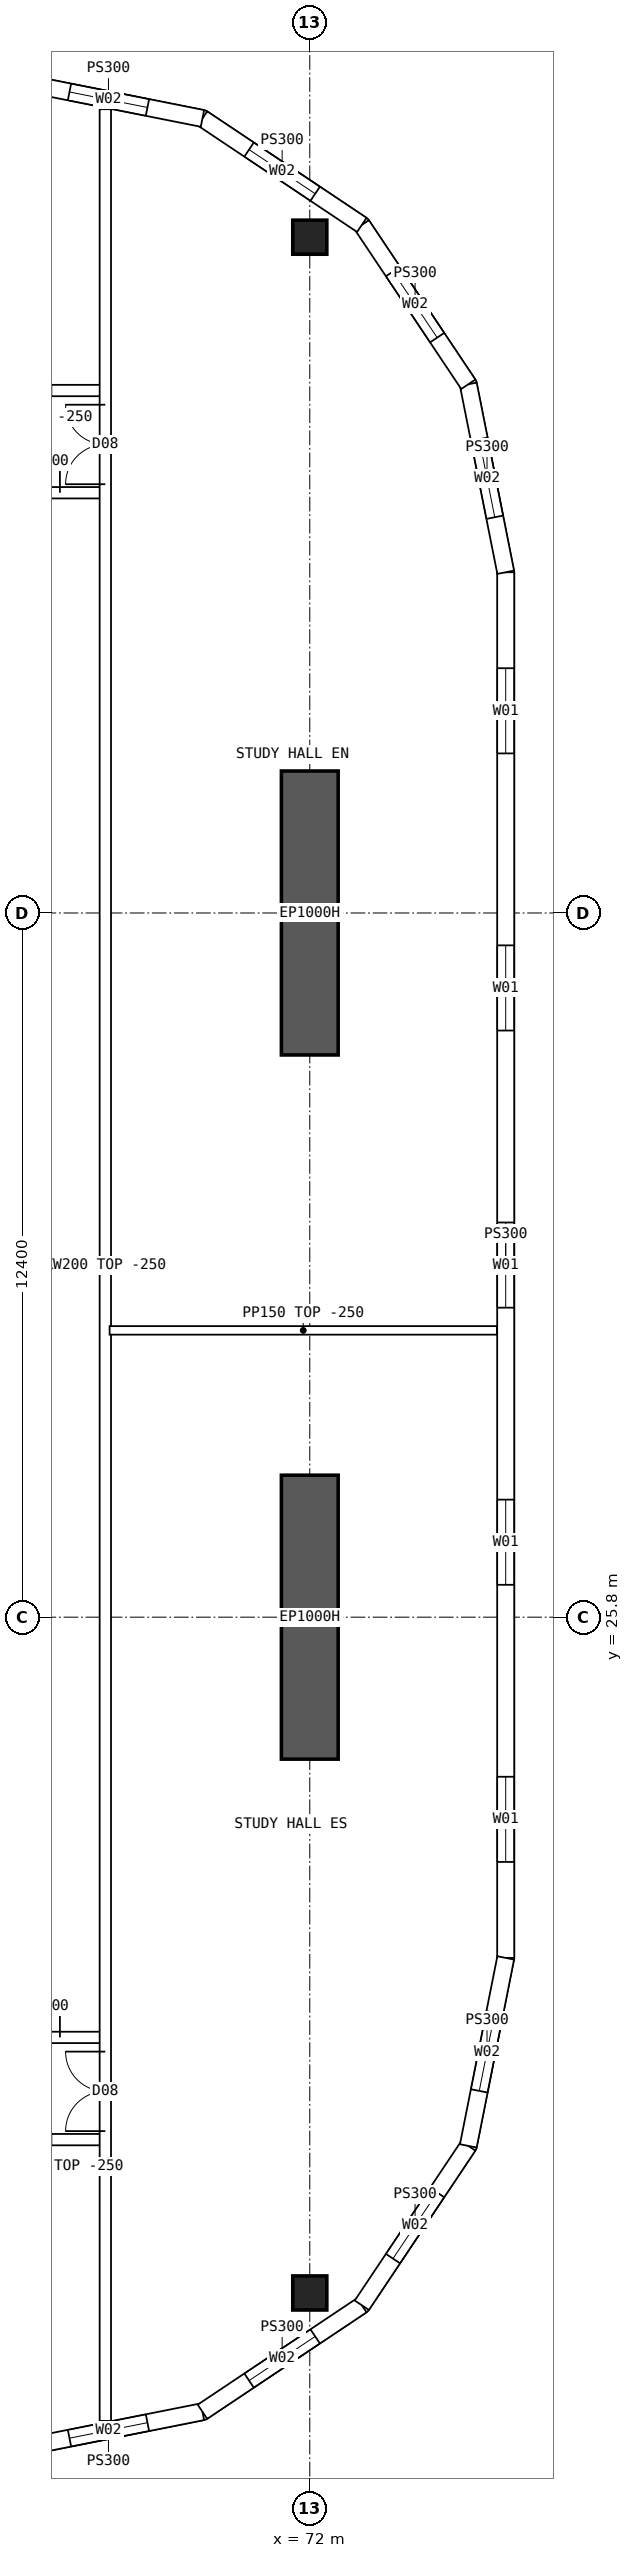
"""IFC4 building model, lengths in metres.
Left out: names, types, materials, properties, quantities, classifications, styles, units other than length and angle.
Written with IfcOpenShell. Run it as: python <this file> out.ifc"""

import sys

from ifc_helpers import new_model, si_unit, direction, frame, frame_2d, origin, origin_2d, place, context, subcontext, project, spatial, polyline, rectangle, hollow_rectangle, outline, extrude, element, fill, save


model = new_model("IFC4")
c1 = context("Model", 3, precision=1e-05, world=origin(), true_north=direction((0.0, 1.0)))
c2 = subcontext(c1, "Body", "Model", "MODEL_VIEW")
j1 = project(units=[si_unit("LENGTHUNIT", "METRE"), si_unit("PLANEANGLEUNIT", "RADIAN")], contexts=[c1])
p1 = place(None, origin())
s1 = spatial("IfcSite", under=j1, at=p1, CompositionType="ELEMENT")
p2 = place(p1, origin())
s2 = spatial("IfcBuilding", under=s1, at=p2, CompositionType="ELEMENT")
p3 = place(p2, frame((0.0, 0.0, 239.05)))
s3 = spatial("IfcBuildingStorey", under=s2, at=p3, CompositionType="ELEMENT", Elevation=239.05)
for number, where, z_axis, x_axis in (
    (1, (72.0, 13.9, 0.0), (0.0, 0.0, 1.0), (1.0, 0.0, 0.0)),
    (2, (72.0, 50.1, 0.0), (0.0, 0.0, 1.0), (1.0, 0.0, 0.0)),
):
    element("IfcColumn", number, at=place(p3, frame(where, z_axis=z_axis, x_axis=x_axis)), inside=s3, PredefinedType="COLUMN", context=c2, shape_type="SweptSolid", body=[
        extrude(hollow_rectangle(XDim=0.6, YDim=0.6, WallThickness=0.06, at=origin_2d()), origin(), (0.0, 0.0, 1.0), 3.75),
    ])
for number, where, z_axis, x_axis in (
    (3, (72.0, 23.3, 0.0), (0.0, 0.0, 1.0), (0.0, 1.0, 0.0)),
    (4, (72.0, 35.7, 0.0), (0.0, 0.0, 1.0), (0.0, 1.0, 0.0)),
):
    element("IfcWall", number, at=place(p3, frame(where, z_axis=z_axis, x_axis=x_axis)), inside=s3, PredefinedType="SHEAR", context=c2, shape_type="SweptSolid", body=[
        extrude(rectangle(XDim=5.0, YDim=1.0, at=frame_2d((2.5, 0.0))), origin(), (0.0, 0.0, 1.0), 3.75),
    ])
p4 = place(p3, frame((75.45, 19.8, 0.0), z_axis=(0.0, 0.0, 1.0), x_axis=(0.0, 1.0, 0.0)))
e5 = element("IfcWall", 5, at=p4, inside=s3, PredefinedType="SOLIDWALL", context=c2, shape_type="SweptSolid", body=[
    extrude(outline(polyline([(-0.015, -0.15), (24.415, -0.15), (24.385, 0.15), (0.015, 0.15), (-0.015, -0.15)])), origin(), (0.0, 0.0, 1.0), 3.5),
])
p5 = place(p4, frame((1.69, 0.0, 0.9)))
e6 = element("IfcOpeningElement", 6, at=p5, cuts=e5, PredefinedType="OPENING", context=c2, shape_type="SweptSolid", body=[
    extrude(rectangle(XDim=1.5, YDim=2.0, at=frame_2d((0.75, 1.0))), frame((0.0, 0.16, 0.0), z_axis=(0.0, -1.0, 0.0), x_axis=(1.0, 0.0, 0.0)), (0.0, 0.0, 1.0), 0.32),
])
p6 = place(p4, frame((6.57, 0.0, 0.9)))
e7 = element("IfcOpeningElement", 7, at=p6, cuts=e5, PredefinedType="OPENING", context=c2, shape_type="SweptSolid", body=[
    extrude(rectangle(XDim=1.5, YDim=2.0, at=frame_2d((0.75, 1.0))), frame((0.0, 0.16, 0.0), z_axis=(0.0, -1.0, 0.0), x_axis=(1.0, 0.0, 0.0)), (0.0, 0.0, 1.0), 0.32),
])
p7 = place(p4, frame((11.45, 0.0, 0.9)))
e8 = element("IfcOpeningElement", 8, at=p7, cuts=e5, PredefinedType="OPENING", context=c2, shape_type="SweptSolid", body=[
    extrude(rectangle(XDim=1.5, YDim=2.0, at=frame_2d((0.75, 1.0))), frame((0.0, 0.16, 0.0), z_axis=(0.0, -1.0, 0.0), x_axis=(1.0, 0.0, 0.0)), (0.0, 0.0, 1.0), 0.32),
])
p8 = place(p4, frame((16.33, 0.0, 0.9)))
e9 = element("IfcOpeningElement", 9, at=p8, cuts=e5, PredefinedType="OPENING", context=c2, shape_type="SweptSolid", body=[
    extrude(rectangle(XDim=1.5, YDim=2.0, at=frame_2d((0.75, 1.0))), frame((0.0, 0.16, 0.0), z_axis=(0.0, -1.0, 0.0), x_axis=(1.0, 0.0, 0.0)), (0.0, 0.0, 1.0), 0.32),
])
p9 = place(p4, frame((21.21, 0.0, 0.9)))
e10 = element("IfcOpeningElement", 10, at=p9, cuts=e5, PredefinedType="OPENING", context=c2, shape_type="SweptSolid", body=[
    extrude(rectangle(XDim=1.5, YDim=2.0, at=frame_2d((0.75, 1.0))), frame((0.0, 0.16, 0.0), z_axis=(0.0, -1.0, 0.0), x_axis=(1.0, 0.0, 0.0)), (0.0, 0.0, 1.0), 0.32),
])
p10 = place(p3, frame((66.8, 11.15, 0.0), z_axis=(0.0, 0.0, 1.0), x_axis=(0.98078325777, 0.195100490205, 0.0)))
e11 = element("IfcWall", 11, at=p10, inside=s3, PredefinedType="SOLIDWALL", context=c2, shape_type="SweptSolid", body=[
    extrude(outline(polyline([(-0.03, -0.15), (3.405, -0.15), (3.345, 0.15), (0.03, 0.15), (-0.03, -0.15)])), origin(), (0.0, 0.0, 1.0), 3.5),
])
p11 = place(p10, frame((0.988, 0.0, 0.9)))
e12 = element("IfcOpeningElement", 12, at=p11, cuts=e11, PredefinedType="OPENING", context=c2, shape_type="SweptSolid", body=[
    extrude(rectangle(XDim=1.4, YDim=1.8, at=frame_2d((0.7, 0.9))), frame((0.0, 0.16, 0.0), z_axis=(0.0, -1.0, 0.0), x_axis=(1.0, 0.0, 0.0)), (0.0, 0.0, 1.0), 0.32),
])
p12 = place(p3, frame((70.11, 11.808, 0.0), z_axis=(0.0, 0.0, 1.0), x_axis=(0.831460037396, 0.555584562613, 0.0)))
e13 = element("IfcWall", 13, at=p12, inside=s3, PredefinedType="SOLIDWALL", context=c2, shape_type="SweptSolid", body=[
    extrude(outline(polyline([(-0.03, -0.15), (3.405, -0.15), (3.345, 0.15), (0.03, 0.15), (-0.03, -0.15)])), origin(), (0.0, 0.0, 1.0), 3.5),
])
p13 = place(p12, frame((0.988, 0.0, 0.9)))
e14 = element("IfcOpeningElement", 14, at=p13, cuts=e13, PredefinedType="OPENING", context=c2, shape_type="SweptSolid", body=[
    extrude(rectangle(XDim=1.4, YDim=1.8, at=frame_2d((0.7, 0.9))), frame((0.0, 0.16, 0.0), z_axis=(0.0, -1.0, 0.0), x_axis=(1.0, 0.0, 0.0)), (0.0, 0.0, 1.0), 0.32),
])
p14 = place(p3, frame((72.917, 13.684, 0.0), z_axis=(0.0, 0.0, 1.0), x_axis=(0.555567969291, 0.831471124873, 0.0)))
e15 = element("IfcWall", 15, at=p14, inside=s3, PredefinedType="SOLIDWALL", context=c2, shape_type="SweptSolid", body=[
    extrude(outline(polyline([(-0.03, -0.15), (3.405, -0.15), (3.345, 0.15), (0.03, 0.15), (-0.03, -0.15)])), origin(), (0.0, 0.0, 1.0), 3.5),
])
p15 = place(p14, frame((0.988, 0.0, 0.9)))
e16 = element("IfcOpeningElement", 16, at=p15, cuts=e15, PredefinedType="OPENING", context=c2, shape_type="SweptSolid", body=[
    extrude(rectangle(XDim=1.4, YDim=1.8, at=frame_2d((0.7, 0.9))), frame((0.0, 0.16, 0.0), z_axis=(0.0, -1.0, 0.0), x_axis=(1.0, 0.0, 0.0)), (0.0, 0.0, 1.0), 0.32),
])
p16 = place(p3, frame((74.792, 16.49, 0.0), z_axis=(0.0, 0.0, 1.0), x_axis=(0.19508664885, 0.980786011034, 0.0)))
e17 = element("IfcWall", 17, at=p16, inside=s3, PredefinedType="SOLIDWALL", context=c2, shape_type="SweptSolid", body=[
    extrude(outline(polyline([(-0.03, -0.15), (3.39, -0.15), (3.36, 0.15), (0.03, 0.15), (-0.03, -0.15)])), origin(), (0.0, 0.0, 1.0), 3.5),
])
p17 = place(p16, frame((0.988, 0.0, 0.9)))
e18 = element("IfcOpeningElement", 18, at=p17, cuts=e17, PredefinedType="OPENING", context=c2, shape_type="SweptSolid", body=[
    extrude(rectangle(XDim=1.4, YDim=1.8, at=frame_2d((0.7, 0.9))), frame((0.0, 0.16, 0.0), z_axis=(0.0, -1.0, 0.0), x_axis=(1.0, 0.0, 0.0)), (0.0, 0.0, 1.0), 0.32),
])
p18 = place(p3, frame((75.45, 44.2, 0.0), z_axis=(0.0, 0.0, 1.0), x_axis=(-0.19508664885, 0.980786011034, 0.0)))
e19 = element("IfcWall", 19, at=p18, inside=s3, PredefinedType="SOLIDWALL", context=c2, shape_type="SweptSolid", body=[
    extrude(outline(polyline([(-0.015, -0.15), (3.405, -0.15), (3.345, 0.15), (0.015, 0.15), (-0.015, -0.15)])), origin(), (0.0, 0.0, 1.0), 3.5),
])
p19 = place(p18, frame((0.988, 0.0, 0.9)))
e20 = element("IfcOpeningElement", 20, at=p19, cuts=e19, PredefinedType="OPENING", context=c2, shape_type="SweptSolid", body=[
    extrude(rectangle(XDim=1.4, YDim=1.8, at=frame_2d((0.7, 0.9))), frame((0.0, 0.16, 0.0), z_axis=(0.0, -1.0, 0.0), x_axis=(1.0, 0.0, 0.0)), (0.0, 0.0, 1.0), 0.32),
])
p20 = place(p3, frame((74.792, 47.51, 0.0), z_axis=(0.0, 0.0, 1.0), x_axis=(-0.555567969291, 0.831471124873, 0.0)))
e21 = element("IfcWall", 21, at=p20, inside=s3, PredefinedType="SOLIDWALL", context=c2, shape_type="SweptSolid", body=[
    extrude(outline(polyline([(-0.03, -0.15), (3.405, -0.15), (3.345, 0.15), (0.03, 0.15), (-0.03, -0.15)])), origin(), (0.0, 0.0, 1.0), 3.5),
])
p21 = place(p20, frame((0.988, 0.0, 0.9)))
e22 = element("IfcOpeningElement", 22, at=p21, cuts=e21, PredefinedType="OPENING", context=c2, shape_type="SweptSolid", body=[
    extrude(rectangle(XDim=1.4, YDim=1.8, at=frame_2d((0.7, 0.9))), frame((0.0, 0.16, 0.0), z_axis=(0.0, -1.0, 0.0), x_axis=(1.0, 0.0, 0.0)), (0.0, 0.0, 1.0), 0.32),
])
p22 = place(p3, frame((72.917, 50.316, 0.0), z_axis=(0.0, 0.0, 1.0), x_axis=(-0.831460037396, 0.555584562613, 0.0)))
e23 = element("IfcWall", 23, at=p22, inside=s3, PredefinedType="SOLIDWALL", context=c2, shape_type="SweptSolid", body=[
    extrude(outline(polyline([(-0.03, -0.15), (3.405, -0.15), (3.345, 0.15), (0.03, 0.15), (-0.03, -0.15)])), origin(), (0.0, 0.0, 1.0), 3.5),
])
p23 = place(p22, frame((0.988, 0.0, 0.9)))
e24 = element("IfcOpeningElement", 24, at=p23, cuts=e23, PredefinedType="OPENING", context=c2, shape_type="SweptSolid", body=[
    extrude(rectangle(XDim=1.4, YDim=1.8, at=frame_2d((0.7, 0.9))), frame((0.0, 0.16, 0.0), z_axis=(0.0, -1.0, 0.0), x_axis=(1.0, 0.0, 0.0)), (0.0, 0.0, 1.0), 0.32),
])
p24 = place(p3, frame((70.11, 52.192, 0.0), z_axis=(0.0, 0.0, 1.0), x_axis=(-0.98078325777, 0.195100490205, 0.0)))
e25 = element("IfcWall", 25, at=p24, inside=s3, PredefinedType="SOLIDWALL", context=c2, shape_type="SweptSolid", body=[
    extrude(outline(polyline([(-0.03, -0.15), (3.405, -0.15), (3.345, 0.15), (0.03, 0.15), (-0.03, -0.15)])), origin(), (0.0, 0.0, 1.0), 3.5),
])
p25 = place(p24, frame((0.988, 0.0, 0.9)))
e26 = element("IfcOpeningElement", 26, at=p25, cuts=e25, PredefinedType="OPENING", context=c2, shape_type="SweptSolid", body=[
    extrude(rectangle(XDim=1.4, YDim=1.8, at=frame_2d((0.7, 0.9))), frame((0.0, 0.16, 0.0), z_axis=(0.0, -1.0, 0.0), x_axis=(1.0, 0.0, 0.0)), (0.0, 0.0, 1.0), 0.32),
])
p26 = place(p3, frame((66.35, 16.6, 0.0), z_axis=(0.0, 0.0, 1.0), x_axis=(1.0, 0.0, 0.0)))
e27 = element("IfcWall", 27, at=p26, inside=s3, PredefinedType="SOLIDWALL", context=c2, shape_type="SweptSolid", body=[
    extrude(rectangle(XDim=2.05, YDim=0.2, at=frame_2d((1.025, 0.0))), origin(), (0.0, 0.0, 1.0), 3.5),
])
p27 = place(p26, frame((0.2, 0.0, 0.0)))
e28 = element("IfcOpeningElement", 28, at=p27, cuts=e27, PredefinedType="OPENING", context=c2, shape_type="SweptSolid", body=[
    extrude(rectangle(XDim=0.9, YDim=2.1, at=frame_2d((0.45, 1.05))), frame((0.0, 0.11, 0.0), z_axis=(0.0, -1.0, 0.0), x_axis=(1.0, 0.0, 0.0)), (0.0, 0.0, 1.0), 0.22),
])
p28 = place(p3, frame((66.35, 18.4, 0.0), z_axis=(0.0, 0.0, 1.0), x_axis=(1.0, 0.0, 0.0)))
e29 = element("IfcWall", 29, at=p28, inside=s3, PredefinedType="SOLIDWALL", context=c2, shape_type="SweptSolid", body=[
    extrude(rectangle(XDim=2.05, YDim=0.2, at=frame_2d((1.025, 0.0))), origin(), (0.0, 0.0, 1.0), 3.5),
])
p29 = place(p28, frame((0.05, 0.0, 0.0)))
e30 = element("IfcOpeningElement", 30, at=p29, cuts=e29, PredefinedType="OPENING", context=c2, shape_type="SweptSolid", body=[
    extrude(rectangle(XDim=1.2, YDim=2.1, at=frame_2d((0.6, 1.05))), frame((0.0, 0.11, 0.0), z_axis=(0.0, -1.0, 0.0), x_axis=(1.0, 0.0, 0.0)), (0.0, 0.0, 1.0), 0.22),
])
p30 = place(p3, frame((66.35, 47.4, 0.0), z_axis=(0.0, 0.0, 1.0), x_axis=(1.0, 0.0, 0.0)))
e31 = element("IfcWall", 31, at=p30, inside=s3, PredefinedType="SOLIDWALL", context=c2, shape_type="SweptSolid", body=[
    extrude(rectangle(XDim=2.05, YDim=0.2, at=frame_2d((1.025, 0.0))), origin(), (0.0, 0.0, 1.0), 3.5),
])
p31 = place(p30, frame((0.2, 0.0, 0.0)))
e32 = element("IfcOpeningElement", 32, at=p31, cuts=e31, PredefinedType="OPENING", context=c2, shape_type="SweptSolid", body=[
    extrude(rectangle(XDim=0.9, YDim=2.1, at=frame_2d((0.45, 1.05))), frame((0.0, 0.11, 0.0), z_axis=(0.0, -1.0, 0.0), x_axis=(1.0, 0.0, 0.0)), (0.0, 0.0, 1.0), 0.22),
])
p32 = place(p3, frame((66.35, 45.6, 0.0), z_axis=(0.0, 0.0, 1.0), x_axis=(1.0, 0.0, 0.0)))
e33 = element("IfcWall", 33, at=p32, inside=s3, PredefinedType="SOLIDWALL", context=c2, shape_type="SweptSolid", body=[
    extrude(rectangle(XDim=2.05, YDim=0.2, at=frame_2d((1.025, 0.0))), origin(), (0.0, 0.0, 1.0), 3.5),
])
p33 = place(p32, frame((0.05, 0.0, 0.0)))
e34 = element("IfcOpeningElement", 34, at=p33, cuts=e33, PredefinedType="OPENING", context=c2, shape_type="SweptSolid", body=[
    extrude(rectangle(XDim=1.2, YDim=2.1, at=frame_2d((0.6, 1.05))), frame((0.0, 0.11, 0.0), z_axis=(0.0, -1.0, 0.0), x_axis=(1.0, 0.0, 0.0)), (0.0, 0.0, 1.0), 0.22),
])
p34 = place(p3, frame((68.475, 30.85, 0.0), z_axis=(0.0, 0.0, 1.0), x_axis=(1.0, 0.0, 0.0)))
e35 = element("IfcWall", 35, at=p34, inside=s3, PredefinedType="PARTITIONING", context=c2, shape_type="SweptSolid", body=[
    extrude(outline(polyline([(0.0, 0.0), (6.82, 0.0), (6.82, 3.5), (3.827, 3.5), (3.825, 3.05), (3.227, 3.05), (3.225, 3.5), (0.0, 3.5), (0.0, 0.0)])), frame((0.0, 0.075, 0.0), z_axis=(0.0, -1.0, 0.0), x_axis=(1.0, 0.0, 0.0)), (0.0, 0.0, 1.0), 0.15),
])
p35 = place(p3, frame((68.4, 11.646, 0.0), z_axis=(0.0, 0.0, 1.0), x_axis=(0.0, 1.0, 0.0)))
e36 = element("IfcWall", 36, at=p35, inside=s3, PredefinedType="SOLIDWALL", context=c2, shape_type="SweptSolid", body=[
    extrude(rectangle(XDim=40.708, YDim=0.2, at=frame_2d((20.354, 0.0))), origin(), (0.0, 0.0, 1.0), 3.5),
])
p36 = place(p35, frame((5.104, 0.0, 0.0)))
e37 = element("IfcOpeningElement", 37, at=p36, cuts=e36, PredefinedType="OPENING", context=c2, shape_type="SweptSolid", body=[
    extrude(rectangle(XDim=1.4, YDim=2.1, at=frame_2d((0.7, 1.05))), frame((0.0, 0.11, 0.0), z_axis=(0.0, -1.0, 0.0), x_axis=(1.0, 0.0, 0.0)), (0.0, 0.0, 1.0), 0.22),
])
p37 = place(p35, frame((34.104, 0.0, 0.0)))
e38 = element("IfcOpeningElement", 38, at=p37, cuts=e36, PredefinedType="OPENING", context=c2, shape_type="SweptSolid", body=[
    extrude(rectangle(XDim=1.4, YDim=2.1, at=frame_2d((0.7, 1.05))), frame((0.0, 0.11, 0.0), z_axis=(0.0, -1.0, 0.0), x_axis=(1.0, 0.0, 0.0)), (0.0, 0.0, 1.0), 0.22),
])
p38 = place(p5, origin())
e39 = element("IfcWindow", 39, at=p38, inside=s3, PartitioningType="SINGLE_PANEL", PredefinedType="WINDOW", context=c2, shape_type="SweptSolid", body=[
    extrude(rectangle(XDim=1.5, YDim=2.0, at=frame_2d((0.75, 1.0))), frame((0.0, 0.03, 0.0), z_axis=(0.0, -1.0, 0.0), x_axis=(1.0, 0.0, 0.0)), (0.0, 0.0, 1.0), 0.06),
])
fill(e6, e39)
p39 = place(p6, origin())
e40 = element("IfcWindow", 40, at=p39, inside=s3, PartitioningType="SINGLE_PANEL", PredefinedType="WINDOW", context=c2, shape_type="SweptSolid", body=[
    extrude(rectangle(XDim=1.5, YDim=2.0, at=frame_2d((0.75, 1.0))), frame((0.0, 0.03, 0.0), z_axis=(0.0, -1.0, 0.0), x_axis=(1.0, 0.0, 0.0)), (0.0, 0.0, 1.0), 0.06),
])
fill(e7, e40)
p40 = place(p7, origin())
e41 = element("IfcWindow", 41, at=p40, inside=s3, PartitioningType="SINGLE_PANEL", PredefinedType="WINDOW", context=c2, shape_type="SweptSolid", body=[
    extrude(rectangle(XDim=1.5, YDim=2.0, at=frame_2d((0.75, 1.0))), frame((0.0, 0.03, 0.0), z_axis=(0.0, -1.0, 0.0), x_axis=(1.0, 0.0, 0.0)), (0.0, 0.0, 1.0), 0.06),
])
fill(e8, e41)
p41 = place(p8, origin())
e42 = element("IfcWindow", 42, at=p41, inside=s3, PartitioningType="SINGLE_PANEL", PredefinedType="WINDOW", context=c2, shape_type="SweptSolid", body=[
    extrude(rectangle(XDim=1.5, YDim=2.0, at=frame_2d((0.75, 1.0))), frame((0.0, 0.03, 0.0), z_axis=(0.0, -1.0, 0.0), x_axis=(1.0, 0.0, 0.0)), (0.0, 0.0, 1.0), 0.06),
])
fill(e9, e42)
p42 = place(p9, origin())
e43 = element("IfcWindow", 43, at=p42, inside=s3, PartitioningType="SINGLE_PANEL", PredefinedType="WINDOW", context=c2, shape_type="SweptSolid", body=[
    extrude(rectangle(XDim=1.5, YDim=2.0, at=frame_2d((0.75, 1.0))), frame((0.0, 0.03, 0.0), z_axis=(0.0, -1.0, 0.0), x_axis=(1.0, 0.0, 0.0)), (0.0, 0.0, 1.0), 0.06),
])
fill(e10, e43)
p43 = place(p11, origin())
e44 = element("IfcWindow", 44, at=p43, inside=s3, PartitioningType="SINGLE_PANEL", PredefinedType="WINDOW", context=c2, shape_type="SweptSolid", body=[
    extrude(rectangle(XDim=1.4, YDim=1.8, at=frame_2d((0.7, 0.9))), frame((0.0, 0.03, 0.0), z_axis=(0.0, -1.0, 0.0), x_axis=(1.0, 0.0, 0.0)), (0.0, 0.0, 1.0), 0.06),
])
fill(e12, e44)
p44 = place(p13, origin())
e45 = element("IfcWindow", 45, at=p44, inside=s3, PartitioningType="SINGLE_PANEL", PredefinedType="WINDOW", context=c2, shape_type="SweptSolid", body=[
    extrude(rectangle(XDim=1.4, YDim=1.8, at=frame_2d((0.7, 0.9))), frame((0.0, 0.03, 0.0), z_axis=(0.0, -1.0, 0.0), x_axis=(1.0, 0.0, 0.0)), (0.0, 0.0, 1.0), 0.06),
])
fill(e14, e45)
p45 = place(p15, origin())
e46 = element("IfcWindow", 46, at=p45, inside=s3, PartitioningType="SINGLE_PANEL", PredefinedType="WINDOW", context=c2, shape_type="SweptSolid", body=[
    extrude(rectangle(XDim=1.4, YDim=1.8, at=frame_2d((0.7, 0.9))), frame((0.0, 0.03, 0.0), z_axis=(0.0, -1.0, 0.0), x_axis=(1.0, 0.0, 0.0)), (0.0, 0.0, 1.0), 0.06),
])
fill(e16, e46)
p46 = place(p17, origin())
e47 = element("IfcWindow", 47, at=p46, inside=s3, PartitioningType="SINGLE_PANEL", PredefinedType="WINDOW", context=c2, shape_type="SweptSolid", body=[
    extrude(rectangle(XDim=1.4, YDim=1.8, at=frame_2d((0.7, 0.9))), frame((0.0, 0.03, 0.0), z_axis=(0.0, -1.0, 0.0), x_axis=(1.0, 0.0, 0.0)), (0.0, 0.0, 1.0), 0.06),
])
fill(e18, e47)
p47 = place(p19, origin())
e48 = element("IfcWindow", 48, at=p47, inside=s3, PartitioningType="SINGLE_PANEL", PredefinedType="WINDOW", context=c2, shape_type="SweptSolid", body=[
    extrude(rectangle(XDim=1.4, YDim=1.8, at=frame_2d((0.7, 0.9))), frame((0.0, 0.03, 0.0), z_axis=(0.0, -1.0, 0.0), x_axis=(1.0, 0.0, 0.0)), (0.0, 0.0, 1.0), 0.06),
])
fill(e20, e48)
p48 = place(p21, origin())
e49 = element("IfcWindow", 49, at=p48, inside=s3, PartitioningType="SINGLE_PANEL", PredefinedType="WINDOW", context=c2, shape_type="SweptSolid", body=[
    extrude(rectangle(XDim=1.4, YDim=1.8, at=frame_2d((0.7, 0.9))), frame((0.0, 0.03, 0.0), z_axis=(0.0, -1.0, 0.0), x_axis=(1.0, 0.0, 0.0)), (0.0, 0.0, 1.0), 0.06),
])
fill(e22, e49)
p49 = place(p23, origin())
e50 = element("IfcWindow", 50, at=p49, inside=s3, PartitioningType="SINGLE_PANEL", PredefinedType="WINDOW", context=c2, shape_type="SweptSolid", body=[
    extrude(rectangle(XDim=1.4, YDim=1.8, at=frame_2d((0.7, 0.9))), frame((0.0, 0.03, 0.0), z_axis=(0.0, -1.0, 0.0), x_axis=(1.0, 0.0, 0.0)), (0.0, 0.0, 1.0), 0.06),
])
fill(e24, e50)
p50 = place(p25, origin())
e51 = element("IfcWindow", 51, at=p50, inside=s3, PartitioningType="SINGLE_PANEL", PredefinedType="WINDOW", context=c2, shape_type="SweptSolid", body=[
    extrude(rectangle(XDim=1.4, YDim=1.8, at=frame_2d((0.7, 0.9))), frame((0.0, 0.03, 0.0), z_axis=(0.0, -1.0, 0.0), x_axis=(1.0, 0.0, 0.0)), (0.0, 0.0, 1.0), 0.06),
])
fill(e26, e51)
p51 = place(p29, origin())
e52 = element("IfcDoor", 52, at=p51, inside=s3, OperationType="DOUBLE_DOOR_SINGLE_SWING", PredefinedType="DOOR", context=c2, shape_type="SweptSolid", body=[
    extrude(rectangle(XDim=1.2, YDim=2.1, at=frame_2d((0.6, 1.05))), frame((0.0, 0.025, 0.0), z_axis=(0.0, -1.0, 0.0), x_axis=(1.0, 0.0, 0.0)), (0.0, 0.0, 1.0), 0.05),
])
fill(e30, e52)
p52 = place(p33, origin())
e53 = element("IfcDoor", 53, at=p52, inside=s3, OperationType="DOUBLE_DOOR_SINGLE_SWING", PredefinedType="DOOR", context=c2, shape_type="SweptSolid", body=[
    extrude(rectangle(XDim=1.2, YDim=2.1, at=frame_2d((0.6, 1.05))), frame((0.0, 0.025, 0.0), z_axis=(0.0, -1.0, 0.0), x_axis=(1.0, 0.0, 0.0)), (0.0, 0.0, 1.0), 0.05),
])
fill(e34, e53)
p53 = place(p36, origin())
e54 = element("IfcDoor", 54, at=p53, inside=s3, OperationType="DOUBLE_DOOR_SINGLE_SWING", PredefinedType="DOOR", context=c2, shape_type="SweptSolid", body=[
    extrude(rectangle(XDim=1.4, YDim=2.1, at=frame_2d((0.7, 1.05))), frame((0.0, 0.025, 0.0), z_axis=(0.0, -1.0, 0.0), x_axis=(1.0, 0.0, 0.0)), (0.0, 0.0, 1.0), 0.05),
])
fill(e37, e54)
p54 = place(p37, origin())
e55 = element("IfcDoor", 55, at=p54, inside=s3, OperationType="DOUBLE_DOOR_SINGLE_SWING", PredefinedType="DOOR", context=c2, shape_type="SweptSolid", body=[
    extrude(rectangle(XDim=1.4, YDim=2.1, at=frame_2d((0.7, 1.05))), frame((0.0, 0.025, 0.0), z_axis=(0.0, -1.0, 0.0), x_axis=(1.0, 0.0, 0.0)), (0.0, 0.0, 1.0), 0.05),
])
fill(e38, e55)
save(model, sys.argv[1])
